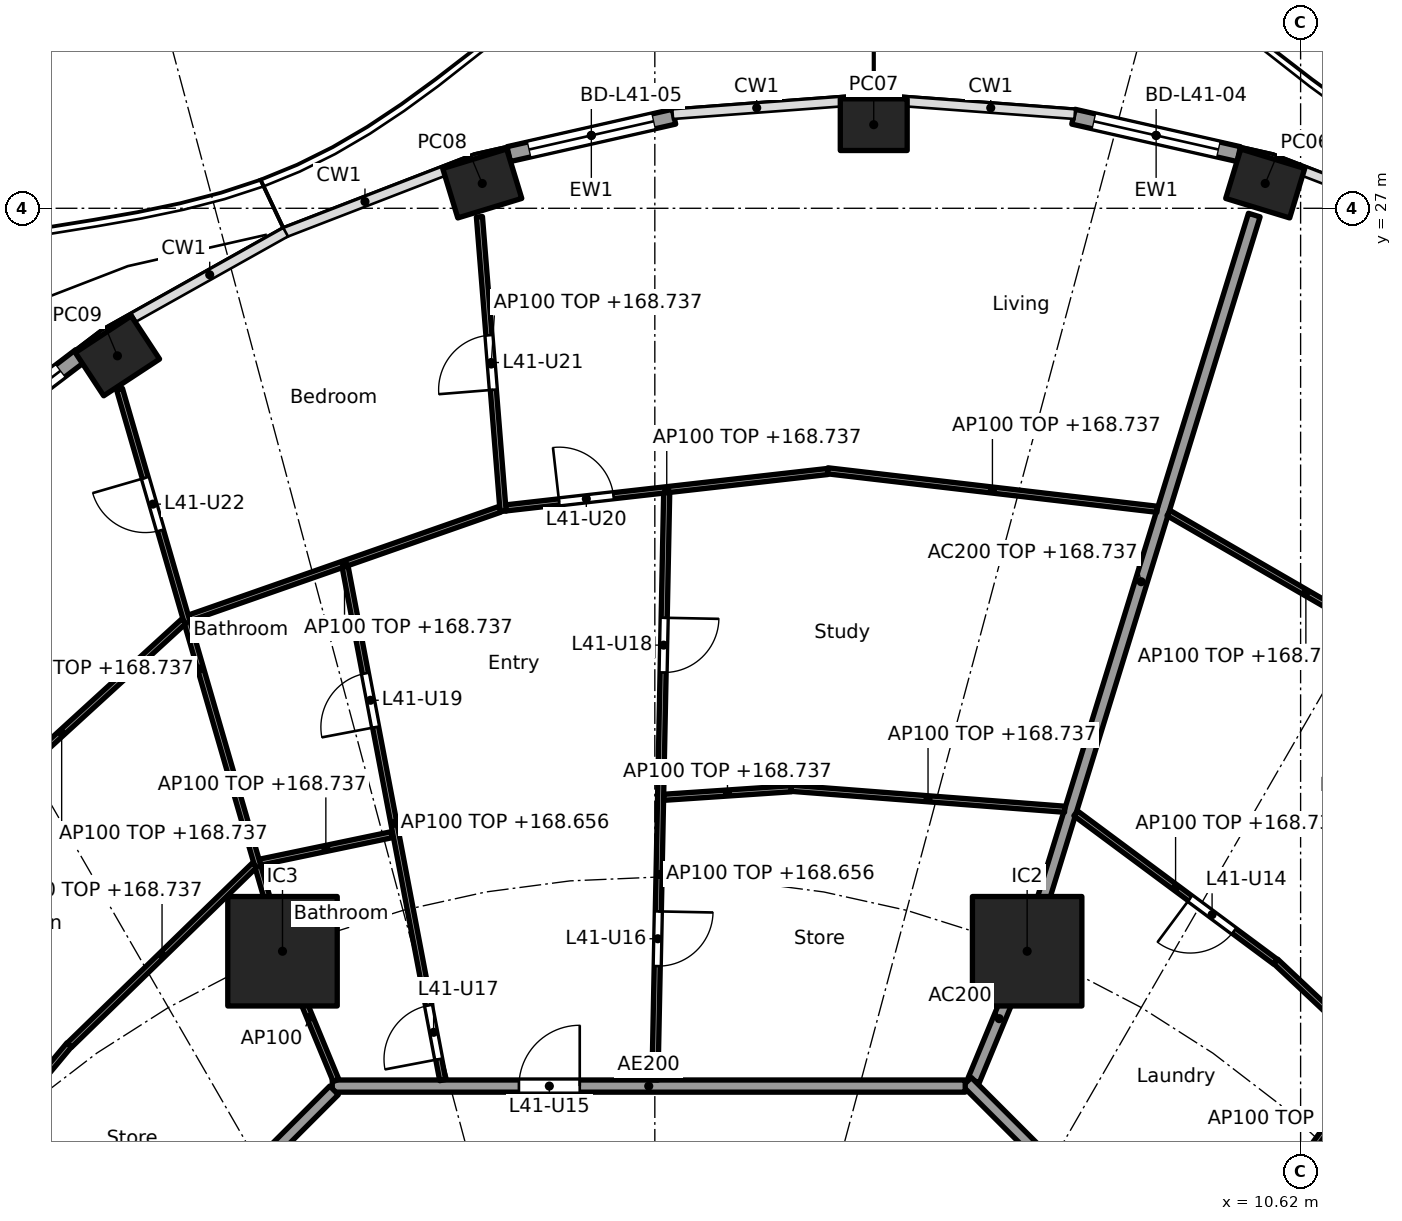
"""IFC4 building model, lengths in metres.
Left out: names, types, materials, properties, quantities, classifications, styles, units other than length and angle.
Written with IfcOpenShell. Run it as: python <this file> out.ifc"""

import sys

from ifc_helpers import new_model, si_unit, direction, frame, frame_2d, origin, origin_2d, place, context, subcontext, project, spatial, rectangle, hollow_rectangle, extrude, element, fill, save


model = new_model("IFC4")
c1 = context("Model", 3, precision=1e-05, world=origin(), true_north=direction((0.0, 1.0)))
c2 = subcontext(c1, "Body", "Model", "MODEL_VIEW")
j1 = project(units=[si_unit("LENGTHUNIT", "METRE"), si_unit("PLANEANGLEUNIT", "RADIAN")], contexts=[c1])
p1 = place(None, origin())
s1 = spatial("IfcSite", under=j1, at=p1, CompositionType="ELEMENT")
p2 = place(p1, origin())
s2 = spatial("IfcBuilding", under=s1, at=p2, CompositionType="ELEMENT")
p3 = place(p2, frame((0.0, 0.0, 165.9)))
s3 = spatial("IfcBuildingStorey", under=s2, at=p3, CompositionType="ELEMENT", Elevation=165.9)
for number, where, z_axis, x_axis in (
    (1, (10.038, 27.408, -0.26), (0.0, 0.0, 1.0), (-0.957, 0.292, 0.0)),
    (2, (3.6, 28.375, -0.26), (0.0, 0.0, 1.0), (-1.0, 0.0, 0.0)),
    (3, (-2.838, 27.408, -0.26), (0.0, 0.0, 1.0), (-0.957, -0.292, 0.0)),
    (4, (-8.837, 24.573, -0.26), (0.0, 0.0, 1.0), (-0.836, -0.549, 0.0)),
):
    element("IfcColumn", number, at=place(p3, frame(where, z_axis=z_axis, x_axis=x_axis)), inside=s3, PredefinedType="COLUMN", context=c2, shape_type="SweptSolid", body=[
        extrude(hollow_rectangle(XDim=1.1, YDim=0.85, WallThickness=0.036, at=origin_2d()), origin(), (0.0, 0.0, 1.0), 3.96),
    ])
for number, where, z_axis, x_axis in (
    (5, (6.123, 14.782, 0.0), (0.0, 0.0, 1.0), (1.0, 0.0, 0.0)),
    (6, (-6.123, 14.782, 0.0), (0.0, 0.0, 1.0), (1.0, 0.0, 0.0)),
):
    element("IfcColumn", number, at=place(p3, frame(where, z_axis=z_axis, x_axis=x_axis)), inside=s3, PredefinedType="COLUMN", context=c2, shape_type="SweptSolid", body=[
        extrude(rectangle(XDim=1.8, YDim=1.8, at=origin_2d()), origin(), (0.0, 0.0, 1.0), 3.7),
    ])
p4 = place(p3, frame((6.885, 28.506, 0.0), z_axis=(0.0, 0.0, 1.0), x_axis=(0.975324329911, -0.220776926974, 0.0)))
e7 = element("IfcWall", 7, at=p4, inside=s3, PredefinedType="SOLIDWALL", context=c2, shape_type="SweptSolid", body=[
    extrude(rectangle(XDim=2.788, YDim=0.25, at=frame_2d((1.394, 0.0))), origin(), (0.0, 0.0, 1.0), 3.44),
])
p5 = place(p4, frame((0.344, 0.0, 0.0)))
e8 = element("IfcOpeningElement", 8, at=p5, cuts=e7, PredefinedType="OPENING", context=c2, shape_type="SweptSolid", body=[
    extrude(rectangle(XDim=2.1, YDim=2.4, at=frame_2d((1.05, 1.2))), frame((0.0, 0.135, 0.0), z_axis=(0.0, -1.0, 0.0), x_axis=(1.0, 0.0, 0.0)), (0.0, 0.0, 1.0), 0.27),
])
p6 = place(p3, frame((-2.404, 27.891, 0.0), z_axis=(0.0, 0.0, 1.0), x_axis=(0.975324329911, 0.220776926974, 0.0)))
e9 = element("IfcWall", 9, at=p6, inside=s3, PredefinedType="SOLIDWALL", context=c2, shape_type="SweptSolid", body=[
    extrude(rectangle(XDim=2.788, YDim=0.25, at=frame_2d((1.394, 0.0))), origin(), (0.0, 0.0, 1.0), 3.44),
])
p7 = place(p6, frame((0.344, 0.0, 0.0)))
e10 = element("IfcOpeningElement", 10, at=p7, cuts=e9, PredefinedType="OPENING", context=c2, shape_type="SweptSolid", body=[
    extrude(rectangle(XDim=2.1, YDim=2.4, at=frame_2d((1.05, 1.2))), frame((0.0, 0.135, 0.0), z_axis=(0.0, -1.0, 0.0), x_axis=(1.0, 0.0, 0.0)), (0.0, 0.0, 1.0), 0.27),
])
p8 = place(p3, frame((-11.772, 22.809, 0.0), z_axis=(0.0, 0.0, 1.0), x_axis=(0.796055733703, 0.60522332146, 0.0)))
e11 = element("IfcWall", 11, at=p8, inside=s3, PredefinedType="SOLIDWALL", context=c2, shape_type="SweptSolid", body=[
    extrude(rectangle(XDim=2.917, YDim=0.25, at=frame_2d((1.458, 0.0))), origin(), (0.0, 0.0, 1.0), 3.44),
])
p9 = place(p8, frame((0.408, 0.0, 0.0)))
e12 = element("IfcOpeningElement", 12, at=p9, cuts=e11, PredefinedType="OPENING", context=c2, shape_type="SweptSolid", body=[
    extrude(rectangle(XDim=2.1, YDim=2.4, at=frame_2d((1.05, 1.2))), frame((0.0, 0.135, 0.0), z_axis=(0.0, -1.0, 0.0), x_axis=(1.0, 0.0, 0.0)), (0.0, 0.0, 1.0), 0.27),
])
p10 = place(p3, frame((5.243, 12.657, 0.0), z_axis=(0.0, 0.0, 1.0), x_axis=(0.382747093259, 0.923853160736, 0.0)))
e13 = element("IfcWall", 13, at=p10, inside=s3, PredefinedType="PARTITIONING", context=c2, shape_type="SweptSolid", body=[
    extrude(rectangle(XDim=2.2, YDim=0.2, at=frame_2d((1.1, 0.0))), origin(), (0.0, 0.0, 1.0), 3.44),
])
p11 = place(p3, frame((6.138, 14.83, 0.0), z_axis=(0.0, 0.0, 1.0), x_axis=(0.294818517221, 0.955553264818, 0.0)))
e14 = element("IfcWall", 14, at=p11, inside=s3, PredefinedType="PARTITIONING", context=c2, shape_type="SweptSolid", body=[
    extrude(rectangle(XDim=12.619, YDim=0.2, at=frame_2d((6.31, 0.0))), origin(), (0.0, 0.0, 1.0), 2.837),
])
p12 = place(p3, frame((12.635, 5.134, 0.0), z_axis=(0.0, 0.0, 1.0), x_axis=(-0.707106781187, 0.707106781187, 0.0)))
e15 = element("IfcWall", 15, at=p12, inside=s3, PredefinedType="PARTITIONING", context=c2, shape_type="SweptSolid", body=[
    extrude(rectangle(XDim=10.609, YDim=0.2, at=frame_2d((5.305, 0.0))), origin(), (0.0, 0.0, 1.0), 3.44),
])
p13 = place(p3, frame((5.104, 12.565, 0.0), z_axis=(0.0, 0.0, 1.0), x_axis=(-1.0, 0.0, 0.0)))
e16 = element("IfcWall", 16, at=p13, inside=s3, PredefinedType="PARTITIONING", context=c2, shape_type="SweptSolid", body=[
    extrude(rectangle(XDim=10.409, YDim=0.2, at=frame_2d((5.205, 0.0))), origin(), (0.0, 0.0, 1.0), 3.44),
])
p14 = place(p13, frame((6.339, 0.0, 0.0)))
e17 = element("IfcOpeningElement", 17, at=p14, cuts=e16, PredefinedType="OPENING", context=c2, shape_type="SweptSolid", body=[
    extrude(rectangle(XDim=1.0, YDim=2.1, at=frame_2d((0.5, 1.05))), frame((0.0, 0.11, 0.0), z_axis=(0.0, -1.0, 0.0), x_axis=(1.0, 0.0, 0.0)), (0.0, 0.0, 1.0), 0.22),
])
p15 = place(p3, frame((-5.275, 12.494, 0.0), z_axis=(0.0, 0.0, 1.0), x_axis=(-0.707106781187, -0.707106781187, 0.0)))
e18 = element("IfcWall", 18, at=p15, inside=s3, PredefinedType="PARTITIONING", context=c2, shape_type="SweptSolid", body=[
    extrude(rectangle(XDim=10.209, YDim=0.2, at=frame_2d((5.104, 0.0))), origin(), (0.0, 0.0, 1.0), 3.44),
])
p16 = place(p3, frame((13.504, 11.52, 0.0), z_axis=(0.0, 0.0, 1.0), x_axis=(-0.728883199496, 0.684638066055, 0.0)))
e19 = element("IfcWall", 19, at=p16, inside=s3, PredefinedType="PARTITIONING", context=c2, shape_type="SweptSolid", body=[
    extrude(rectangle(XDim=4.519, YDim=0.1, at=frame_2d((2.26, 0.0))), origin(), (0.0, 0.0, 1.0), 2.837),
])
p17 = place(p3, frame((8.943, 8.966, 0.0), z_axis=(0.0, 0.0, 1.0), x_axis=(0.587187896734, 0.809450661825, 0.0)))
e20 = element("IfcWall", 20, at=p17, inside=s3, PredefinedType="PARTITIONING", context=c2, shape_type="SweptSolid", body=[
    extrude(rectangle(XDim=4.975, YDim=0.1, at=frame_2d((2.487, 0.0))), origin(), (0.0, 0.0, 1.0), 2.756),
])
p18 = place(p3, frame((10.207, 14.61, 0.0), z_axis=(0.0, 0.0, 1.0), x_axis=(-0.802769141821, 0.596289950394, 0.0)))
e21 = element("IfcWall", 21, at=p18, inside=s3, PredefinedType="PARTITIONING", context=c2, shape_type="SweptSolid", body=[
    extrude(rectangle(XDim=4.092, YDim=0.1, at=frame_2d((2.046, 0.0))), origin(), (0.0, 0.0, 1.0), 2.837),
])
p19 = place(p18, frame((0.848, 0.0, 0.0)))
e22 = element("IfcOpeningElement", 22, at=p19, cuts=e21, PredefinedType="OPENING", context=c2, shape_type="SweptSolid", body=[
    extrude(rectangle(XDim=0.9, YDim=2.1, at=frame_2d((0.45, 1.05))), frame((0.0, 0.06, 0.0), z_axis=(0.0, -1.0, 0.0), x_axis=(1.0, 0.0, 0.0)), (0.0, 0.0, 1.0), 0.12),
])
p20 = place(p3, frame((12.965, 19.371, 0.0), z_axis=(0.0, 0.0, 1.0), x_axis=(-0.865286427811, 0.501277765163, 0.0)))
e23 = element("IfcWall", 23, at=p20, inside=s3, PredefinedType="PARTITIONING", context=c2, shape_type="SweptSolid", body=[
    extrude(rectangle(XDim=5.22, YDim=0.1, at=frame_2d((2.61, 0.0))), origin(), (0.0, 0.0, 1.0), 2.837),
])
p21 = place(p3, frame((6.741, 17.117, 0.0), z_axis=(0.0, 0.0, 1.0), x_axis=(-0.997078320723, 0.076386008825, 0.0)))
e24 = element("IfcWall", 24, at=p21, inside=s3, PredefinedType="PARTITIONING", context=c2, shape_type="SweptSolid", body=[
    extrude(rectangle(XDim=4.51, YDim=0.1, at=frame_2d((2.255, 0.0))), origin(), (0.0, 0.0, 1.0), 2.837),
])
p22 = place(p3, frame((8.262, 22.05, 0.0), z_axis=(0.0, 0.0, 1.0), x_axis=(-0.993250089265, 0.115992500516, 0.0)))
e25 = element("IfcWall", 25, at=p22, inside=s3, PredefinedType="PARTITIONING", context=c2, shape_type="SweptSolid", body=[
    extrude(rectangle(XDim=5.458, YDim=0.1, at=frame_2d((2.729, 0.0))), origin(), (0.0, 0.0, 1.0), 2.837),
])
p23 = place(p3, frame((2.244, 17.455, 0.0), z_axis=(0.0, 0.0, 1.0), x_axis=(-0.997756833447, -0.06694252243, 0.0)))
e26 = element("IfcWall", 26, at=p23, inside=s3, PredefinedType="PARTITIONING", context=c2, shape_type="SweptSolid", body=[
    extrude(rectangle(XDim=2.104, YDim=0.1, at=frame_2d((1.052, 0.0))), origin(), (0.0, 0.0, 1.0), 2.837),
])
p24 = place(p3, frame((2.842, 22.671, 0.0), z_axis=(0.0, 0.0, 1.0), x_axis=(-0.993660315081, -0.112424099879, 0.0)))
e27 = element("IfcWall", 27, at=p24, inside=s3, PredefinedType="PARTITIONING", context=c2, shape_type="SweptSolid", body=[
    extrude(rectangle(XDim=5.325, YDim=0.1, at=frame_2d((2.662, 0.0))), origin(), (0.0, 0.0, 1.0), 2.837),
])
p25 = place(p24, frame((3.544, 0.0, 0.0)))
e28 = element("IfcOpeningElement", 28, at=p25, cuts=e27, PredefinedType="OPENING", context=c2, shape_type="SweptSolid", body=[
    extrude(rectangle(XDim=0.9, YDim=2.1, at=frame_2d((0.45, 1.05))), frame((0.0, 0.06, 0.0), z_axis=(0.0, -1.0, 0.0), x_axis=(1.0, 0.0, 0.0)), (0.0, 0.0, 1.0), 0.12),
])
p26 = place(p3, frame((0.002, 12.665, 0.0), z_axis=(0.0, 0.0, 1.0), x_axis=(0.019992969345, 0.999800120613, 0.0)))
e29 = element("IfcWall", 29, at=p26, inside=s3, PredefinedType="PARTITIONING", context=c2, shape_type="SweptSolid", body=[
    extrude(rectangle(XDim=9.659, YDim=0.1, at=frame_2d((4.83, 0.0))), origin(), (0.0, 0.0, 1.0), 2.756),
])
p27 = place(p26, frame((1.873, 0.0, 0.0)))
e30 = element("IfcOpeningElement", 30, at=p27, cuts=e29, PredefinedType="OPENING", context=c2, shape_type="SweptSolid", body=[
    extrude(rectangle(XDim=0.9, YDim=2.1, at=frame_2d((0.45, 1.05))), frame((0.0, 0.06, 0.0), z_axis=(0.0, -1.0, 0.0), x_axis=(1.0, 0.0, 0.0)), (0.0, 0.0, 1.0), 0.12),
])
p28 = place(p26, frame((6.703, 0.0, 0.0)))
e31 = element("IfcOpeningElement", 31, at=p28, cuts=e29, PredefinedType="OPENING", context=c2, shape_type="SweptSolid", body=[
    extrude(rectangle(XDim=0.9, YDim=2.1, at=frame_2d((0.45, 1.05))), frame((0.0, 0.06, 0.0), z_axis=(0.0, -1.0, 0.0), x_axis=(1.0, 0.0, 0.0)), (0.0, 0.0, 1.0), 0.12),
])
p29 = place(p3, frame((-2.495, 22.017, 0.0), z_axis=(0.0, 0.0, 1.0), x_axis=(-0.080150660566, 0.99678276049, 0.0)))
e32 = element("IfcWall", 32, at=p29, inside=s3, PredefinedType="PARTITIONING", context=c2, shape_type="SweptSolid", body=[
    extrude(rectangle(XDim=4.858, YDim=0.1, at=frame_2d((2.429, 0.0))), origin(), (0.0, 0.0, 1.0), 2.837),
])
p30 = place(p29, frame((2.004, 0.0, 0.0)))
e33 = element("IfcOpeningElement", 33, at=p30, cuts=e32, PredefinedType="OPENING", context=c2, shape_type="SweptSolid", body=[
    extrude(rectangle(XDim=0.9, YDim=2.1, at=frame_2d((0.45, 1.05))), frame((0.0, 0.06, 0.0), z_axis=(0.0, -1.0, 0.0), x_axis=(1.0, 0.0, 0.0)), (0.0, 0.0, 1.0), 0.12),
])
p31 = place(p3, frame((-2.546, 22.051, 0.0), z_axis=(0.0, 0.0, 1.0), x_axis=(-0.943911038661, -0.330199865375, 0.0)))
e34 = element("IfcWall", 34, at=p31, inside=s3, PredefinedType="PARTITIONING", context=c2, shape_type="SweptSolid", body=[
    extrude(rectangle(XDim=5.417, YDim=0.1, at=frame_2d((2.709, 0.0))), origin(), (0.0, 0.0, 1.0), 2.837),
])
p32 = place(p3, frame((-3.488, 12.663, 0.0), z_axis=(0.0, 0.0, 1.0), x_axis=(-0.186783185485, 0.982401161247, 0.0)))
e35 = element("IfcWall", 35, at=p32, inside=s3, PredefinedType="PARTITIONING", context=c2, shape_type="SweptSolid", body=[
    extrude(rectangle(XDim=8.595, YDim=0.1, at=frame_2d((4.298, 0.0))), origin(), (0.0, 0.0, 1.0), 2.756),
])
p33 = place(p32, frame((0.35, 0.0, 0.0)))
e36 = element("IfcOpeningElement", 36, at=p33, cuts=e35, PredefinedType="OPENING", context=c2, shape_type="SweptSolid", body=[
    extrude(rectangle(XDim=0.9, YDim=2.1, at=frame_2d((0.45, 1.05))), frame((0.0, 0.06, 0.0), z_axis=(0.0, -1.0, 0.0), x_axis=(1.0, 0.0, 0.0)), (0.0, 0.0, 1.0), 0.12),
])
p34 = place(p32, frame((5.908, 0.0, 0.0)))
e37 = element("IfcOpeningElement", 37, at=p34, cuts=e35, PredefinedType="OPENING", context=c2, shape_type="SweptSolid", body=[
    extrude(rectangle(XDim=0.9, YDim=2.1, at=frame_2d((0.45, 1.05))), frame((0.0, 0.06, 0.0), z_axis=(0.0, -1.0, 0.0), x_axis=(1.0, 0.0, 0.0)), (0.0, 0.0, 1.0), 0.12),
])
p35 = place(p3, frame((-4.324, 16.699, 0.0), z_axis=(0.0, 0.0, 1.0), x_axis=(-0.978908011866, -0.204301503432, 0.0)))
e38 = element("IfcWall", 38, at=p35, inside=s3, PredefinedType="PARTITIONING", context=c2, shape_type="SweptSolid", body=[
    extrude(rectangle(XDim=2.218, YDim=0.1, at=frame_2d((1.109, 0.0))), origin(), (0.0, 0.0, 1.0), 2.837),
])
p36 = place(p3, frame((-5.243, 12.657, 0.0), z_axis=(0.0, 0.0, 1.0), x_axis=(-0.382719158442, 0.923864733477, 0.0)))
e39 = element("IfcWall", 39, at=p36, inside=s3, PredefinedType="PARTITIONING", context=c2, shape_type="SweptSolid", body=[
    extrude(rectangle(XDim=2.25, YDim=0.1, at=frame_2d((1.125, 0.0))), origin(), (0.0, 0.0, 1.0), 3.44),
])
p37 = place(p3, frame((-6.137, 14.83, 0.0), z_axis=(0.0, 0.0, 1.0), x_axis=(-0.278461169897, 0.96044748782, 0.0)))
e40 = element("IfcWall", 40, at=p37, inside=s3, PredefinedType="PARTITIONING", context=c2, shape_type="SweptSolid", body=[
    extrude(rectangle(XDim=9.573, YDim=0.1, at=frame_2d((4.787, 0.0))), origin(), (0.0, 0.0, 1.0), 2.837),
])
p38 = place(p37, frame((7.156, 0.0, 0.0)))
e41 = element("IfcOpeningElement", 41, at=p38, cuts=e40, PredefinedType="OPENING", context=c2, shape_type="SweptSolid", body=[
    extrude(rectangle(XDim=0.9, YDim=2.1, at=frame_2d((0.45, 1.05))), frame((0.0, 0.06, 0.0), z_axis=(0.0, -1.0, 0.0), x_axis=(1.0, 0.0, 0.0)), (0.0, 0.0, 1.0), 0.12),
])
p39 = place(p3, frame((-6.58, 16.201, 0.0), z_axis=(0.0, 0.0, 1.0), x_axis=(-0.716946269374, -0.697128429223, 0.0)))
e42 = element("IfcWall", 42, at=p39, inside=s3, PredefinedType="PARTITIONING", context=c2, shape_type="SweptSolid", body=[
    extrude(rectangle(XDim=4.25, YDim=0.1, at=frame_2d((2.125, 0.0))), origin(), (0.0, 0.0, 1.0), 2.837),
])
p40 = place(p3, frame((-7.744, 20.212, 0.0), z_axis=(0.0, 0.0, 1.0), x_axis=(-0.738051761282, -0.674744097913, 0.0)))
e43 = element("IfcWall", 43, at=p40, inside=s3, PredefinedType="PARTITIONING", context=c2, shape_type="SweptSolid", body=[
    extrude(rectangle(XDim=5.449, YDim=0.1, at=frame_2d((2.725, 0.0))), origin(), (0.0, 0.0, 1.0), 2.837),
])
p41 = place(p3, frame((-9.631, 13.242, 0.0), z_axis=(0.0, 0.0, 1.0), x_axis=(-0.640315711982, -0.768111833647, 0.0)))
e44 = element("IfcWall", 44, at=p41, inside=s3, PredefinedType="PARTITIONING", context=c2, shape_type="SweptSolid", body=[
    extrude(rectangle(XDim=4.572, YDim=0.1, at=frame_2d((2.286, 0.0))), origin(), (0.0, 0.0, 1.0), 2.837),
])
p42 = place(p41, frame((1.861, 0.0, 0.0)))
e45 = element("IfcOpeningElement", 45, at=p42, cuts=e44, PredefinedType="OPENING", context=c2, shape_type="SweptSolid", body=[
    extrude(rectangle(XDim=0.9, YDim=2.1, at=frame_2d((0.45, 1.05))), frame((0.0, 0.06, 0.0), z_axis=(0.0, -1.0, 0.0), x_axis=(1.0, 0.0, 0.0)), (0.0, 0.0, 1.0), 0.12),
])
p43 = place(p5, origin())
e46 = element("IfcDoor", 46, at=p43, inside=s3, OperationType="SLIDING_TO_LEFT", PredefinedType="DOOR", context=c2, shape_type="SweptSolid", body=[
    extrude(rectangle(XDim=2.1, YDim=2.4, at=frame_2d((1.05, 1.2))), frame((0.0, 0.025, 0.0), z_axis=(0.0, -1.0, 0.0), x_axis=(1.0, 0.0, 0.0)), (0.0, 0.0, 1.0), 0.05),
])
fill(e8, e46)
p44 = place(p7, origin())
e47 = element("IfcDoor", 47, at=p44, inside=s3, OperationType="SLIDING_TO_LEFT", PredefinedType="DOOR", context=c2, shape_type="SweptSolid", body=[
    extrude(rectangle(XDim=2.1, YDim=2.4, at=frame_2d((1.05, 1.2))), frame((0.0, 0.025, 0.0), z_axis=(0.0, -1.0, 0.0), x_axis=(1.0, 0.0, 0.0)), (0.0, 0.0, 1.0), 0.05),
])
fill(e10, e47)
p45 = place(p9, origin())
e48 = element("IfcDoor", 48, at=p45, inside=s3, OperationType="SLIDING_TO_LEFT", PredefinedType="DOOR", context=c2, shape_type="SweptSolid", body=[
    extrude(rectangle(XDim=2.1, YDim=2.4, at=frame_2d((1.05, 1.2))), frame((0.0, 0.025, 0.0), z_axis=(0.0, -1.0, 0.0), x_axis=(1.0, 0.0, 0.0)), (0.0, 0.0, 1.0), 0.05),
])
fill(e12, e48)
p46 = place(p19, origin())
e49 = element("IfcDoor", 49, at=p46, inside=s3, OperationType="SINGLE_SWING_RIGHT", PredefinedType="DOOR", context=c2, shape_type="SweptSolid", body=[
    extrude(rectangle(XDim=0.9, YDim=2.1, at=frame_2d((0.45, 1.05))), frame((0.0, 0.025, 0.0), z_axis=(0.0, -1.0, 0.0), x_axis=(1.0, 0.0, 0.0)), (0.0, 0.0, 1.0), 0.05),
])
fill(e22, e49)
p47 = place(p14, frame((1.0, 0.0, 0.0), x_axis=(-1.0, 0.0, 0.0)))
e50 = element("IfcDoor", 50, at=p47, inside=s3, OperationType="SINGLE_SWING_RIGHT", PredefinedType="DOOR", context=c2, shape_type="SweptSolid", body=[
    extrude(rectangle(XDim=1.0, YDim=2.1, at=frame_2d((0.5, 1.05))), frame((0.0, 0.025, 0.0), z_axis=(0.0, -1.0, 0.0), x_axis=(1.0, 0.0, 0.0)), (0.0, 0.0, 1.0), 0.05),
])
fill(e17, e50)
p48 = place(p27, frame((0.9, 0.0, 0.0), x_axis=(-1.0, 0.0, 0.0)))
e51 = element("IfcDoor", 51, at=p48, inside=s3, OperationType="SINGLE_SWING_LEFT", PredefinedType="DOOR", context=c2, shape_type="SweptSolid", body=[
    extrude(rectangle(XDim=0.9, YDim=2.1, at=frame_2d((0.45, 1.05))), frame((0.0, 0.025, 0.0), z_axis=(0.0, -1.0, 0.0), x_axis=(1.0, 0.0, 0.0)), (0.0, 0.0, 1.0), 0.05),
])
fill(e30, e51)
p49 = place(p33, origin())
e52 = element("IfcDoor", 52, at=p49, inside=s3, OperationType="SINGLE_SWING_LEFT", PredefinedType="DOOR", context=c2, shape_type="SweptSolid", body=[
    extrude(rectangle(XDim=0.9, YDim=2.1, at=frame_2d((0.45, 1.05))), frame((0.0, 0.025, 0.0), z_axis=(0.0, -1.0, 0.0), x_axis=(1.0, 0.0, 0.0)), (0.0, 0.0, 1.0), 0.05),
])
fill(e36, e52)
p50 = place(p28, frame((0.9, 0.0, 0.0), x_axis=(-1.0, 0.0, 0.0)))
e53 = element("IfcDoor", 53, at=p50, inside=s3, OperationType="SINGLE_SWING_LEFT", PredefinedType="DOOR", context=c2, shape_type="SweptSolid", body=[
    extrude(rectangle(XDim=0.9, YDim=2.1, at=frame_2d((0.45, 1.05))), frame((0.0, 0.025, 0.0), z_axis=(0.0, -1.0, 0.0), x_axis=(1.0, 0.0, 0.0)), (0.0, 0.0, 1.0), 0.05),
])
fill(e31, e53)
p51 = place(p34, origin())
e54 = element("IfcDoor", 54, at=p51, inside=s3, OperationType="SINGLE_SWING_LEFT", PredefinedType="DOOR", context=c2, shape_type="SweptSolid", body=[
    extrude(rectangle(XDim=0.9, YDim=2.1, at=frame_2d((0.45, 1.05))), frame((0.0, 0.025, 0.0), z_axis=(0.0, -1.0, 0.0), x_axis=(1.0, 0.0, 0.0)), (0.0, 0.0, 1.0), 0.05),
])
fill(e37, e54)
p52 = place(p25, frame((0.9, 0.0, 0.0), x_axis=(-1.0, 0.0, 0.0)))
e55 = element("IfcDoor", 55, at=p52, inside=s3, OperationType="SINGLE_SWING_LEFT", PredefinedType="DOOR", context=c2, shape_type="SweptSolid", body=[
    extrude(rectangle(XDim=0.9, YDim=2.1, at=frame_2d((0.45, 1.05))), frame((0.0, 0.025, 0.0), z_axis=(0.0, -1.0, 0.0), x_axis=(1.0, 0.0, 0.0)), (0.0, 0.0, 1.0), 0.05),
])
fill(e28, e55)
p53 = place(p30, origin())
e56 = element("IfcDoor", 56, at=p53, inside=s3, OperationType="SINGLE_SWING_LEFT", PredefinedType="DOOR", context=c2, shape_type="SweptSolid", body=[
    extrude(rectangle(XDim=0.9, YDim=2.1, at=frame_2d((0.45, 1.05))), frame((0.0, 0.025, 0.0), z_axis=(0.0, -1.0, 0.0), x_axis=(1.0, 0.0, 0.0)), (0.0, 0.0, 1.0), 0.05),
])
fill(e33, e56)
p54 = place(p38, origin())
e57 = element("IfcDoor", 57, at=p54, inside=s3, OperationType="SINGLE_SWING_RIGHT", PredefinedType="DOOR", context=c2, shape_type="SweptSolid", body=[
    extrude(rectangle(XDim=0.9, YDim=2.1, at=frame_2d((0.45, 1.05))), frame((0.0, 0.025, 0.0), z_axis=(0.0, -1.0, 0.0), x_axis=(1.0, 0.0, 0.0)), (0.0, 0.0, 1.0), 0.05),
])
fill(e41, e57)
save(model, sys.argv[1])
